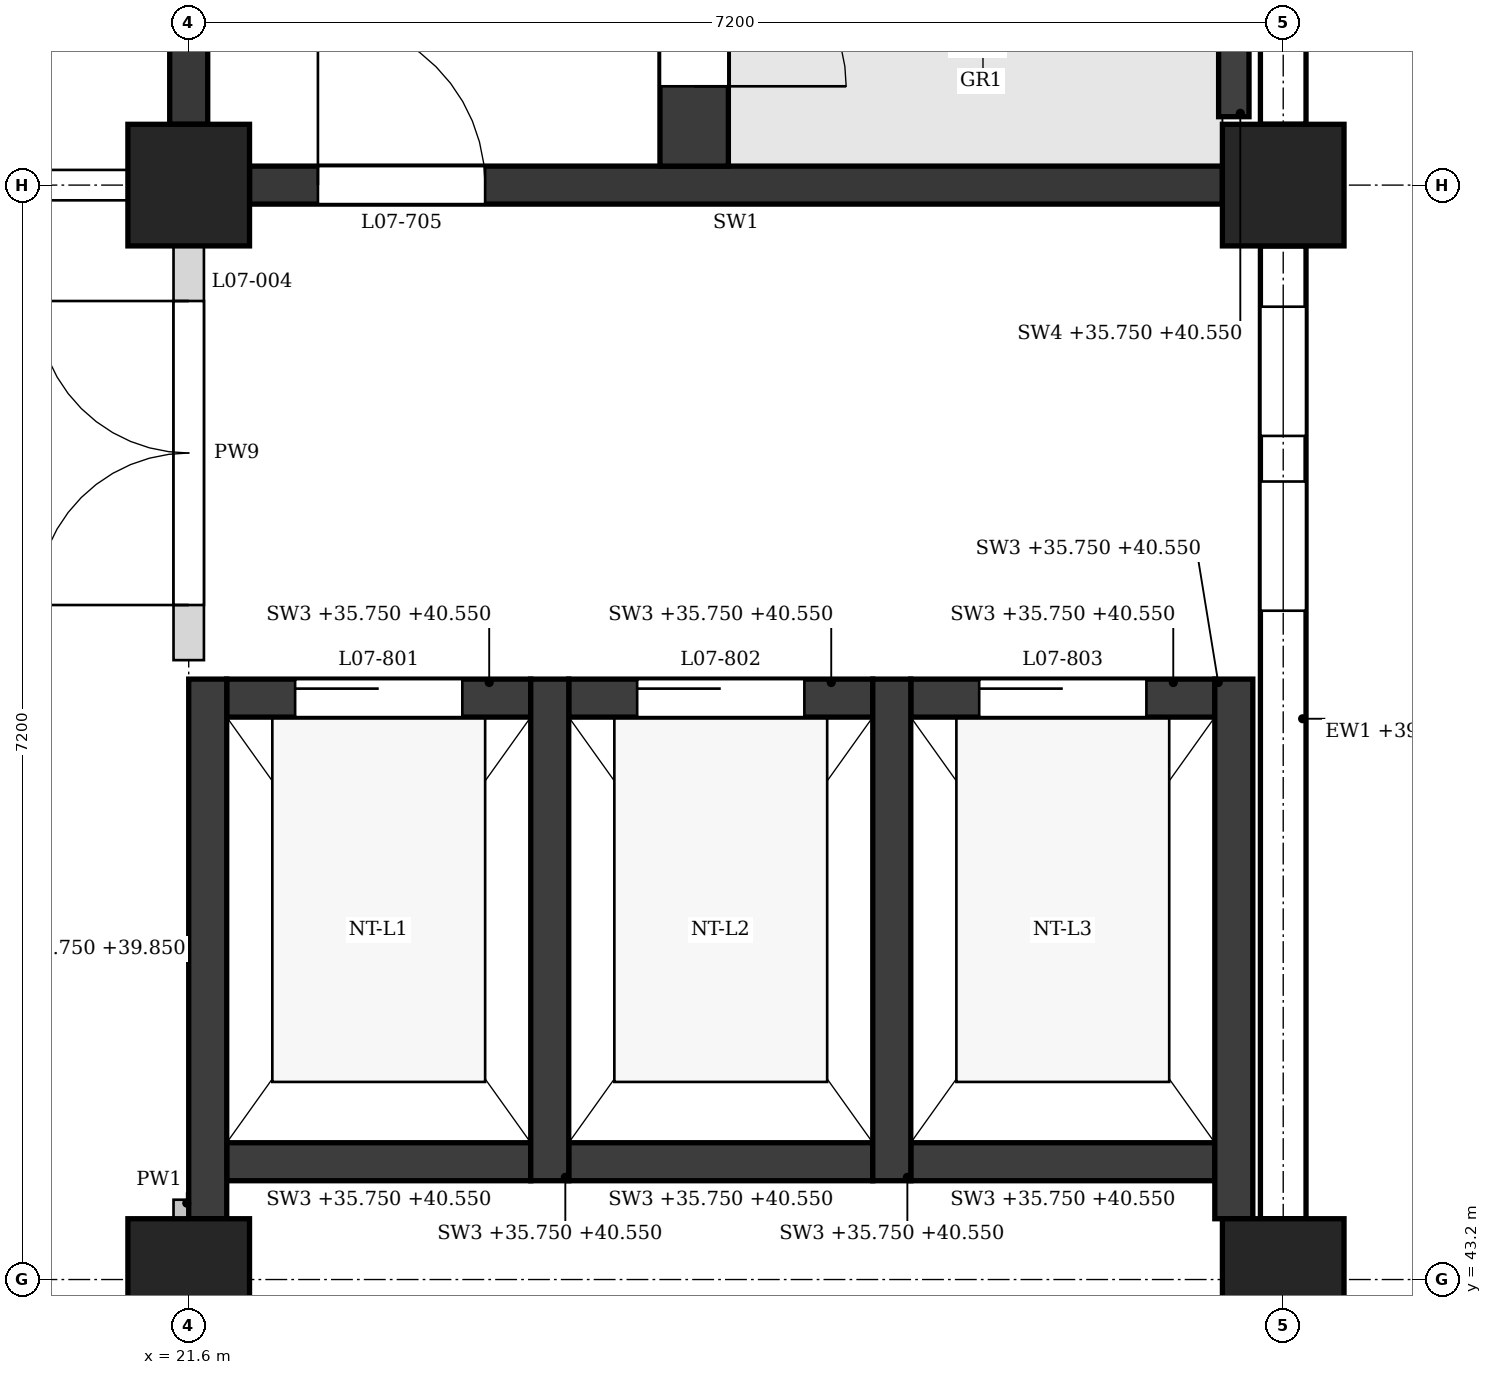
"""IFC4 building model, lengths in metres.
Left out: names, types, materials, properties, quantities, classifications, styles, units other than length and angle.
Written with IfcOpenShell. Run it as: python <this file> out.ifc"""

import sys

from ifc_helpers import new_model, si_unit, direction, frame, frame_2d, origin, origin_2d, place, context, subcontext, project, spatial, polyline, rectangle, outline, extrude, element, fill, save


model = new_model("IFC4")
c1 = context("Model", 3, precision=1e-05, world=origin(), true_north=direction((0.0, 1.0)))
c2 = subcontext(c1, "Body", "Model", "MODEL_VIEW")
j1 = project(units=[si_unit("LENGTHUNIT", "METRE"), si_unit("PLANEANGLEUNIT", "RADIAN")], contexts=[c1])
p1 = place(None, origin())
s1 = spatial("IfcSite", under=j1, at=p1, CompositionType="ELEMENT")
p2 = place(p1, origin())
s2 = spatial("IfcBuilding", under=s1, at=p2, CompositionType="ELEMENT")
p3 = place(p2, frame((0.0, 0.0, 36.0)))
s3 = spatial("IfcBuildingStorey", under=s2, at=p3, CompositionType="ELEMENT", Elevation=36.0)
for number, where, z_axis, x_axis in (
    (1, (21.6, 43.2, 0.0), (0.0, 0.0, 1.0), (1.0, 0.0, 0.0)),
    (2, (21.6, 50.4, 0.0), (0.0, 0.0, 1.0), (1.0, 0.0, 0.0)),
    (3, (28.8, 43.2, 0.0), (0.0, 0.0, 1.0), (1.0, 0.0, 0.0)),
    (4, (28.8, 50.4, 0.0), (0.0, 0.0, 1.0), (1.0, 0.0, 0.0)),
):
    element("IfcColumn", number, at=place(p3, frame(where, z_axis=z_axis, x_axis=x_axis)), inside=s3, PredefinedType="COLUMN", context=c2, shape_type="SweptSolid", body=[
        extrude(rectangle(XDim=0.8, YDim=0.8, at=origin_2d()), origin(), (0.0, 0.0, 1.0), 4.8),
    ])
p4 = place(p3, frame((28.8, 43.6, 0.0), z_axis=(0.0, 0.0, 1.0), x_axis=(0.0, 1.0, 0.0)))
e5 = element("IfcWall", 5, at=p4, inside=s3, PredefinedType="STANDARD", context=c2, shape_type="SweptSolid", body=[
    extrude(rectangle(XDim=6.4, YDim=0.3, at=frame_2d((3.2, 0.0))), origin(), (0.0, 0.0, 1.0), 3.95),
])
p5 = place(p4, frame((4.0, 0.0, 0.9)))
e6 = element("IfcOpeningElement", 6, at=p5, cuts=e5, PredefinedType="OPENING", context=c2, shape_type="SweptSolid", body=[
    extrude(outline(polyline([(0.0, 0.0), (0.85, 0.0), (0.85, 2.55), (0.425, 3.0), (0.0, 2.55), (0.0, 0.0)])), frame((0.0, 0.16, 0.0), z_axis=(0.0, -1.0, 0.0), x_axis=(1.0, 0.0, 0.0)), (0.0, 0.0, 1.0), 0.32),
])
p6 = place(p4, frame((5.15, 0.0, 0.9)))
e7 = element("IfcOpeningElement", 7, at=p6, cuts=e5, PredefinedType="OPENING", context=c2, shape_type="SweptSolid", body=[
    extrude(outline(polyline([(0.0, 0.0), (0.85, 0.0), (0.85, 2.55), (0.425, 3.0), (0.0, 2.55), (0.0, 0.0)])), frame((0.0, 0.16, 0.0), z_axis=(0.0, -1.0, 0.0), x_axis=(1.0, 0.0, 0.0)), (0.0, 0.0, 1.0), 0.32),
])
p7 = place(p3, frame((28.8, 50.8, 0.0), z_axis=(0.0, 0.0, 1.0), x_axis=(0.0, 1.0, 0.0)))
e8 = element("IfcWall", 8, at=p7, inside=s3, PredefinedType="STANDARD", context=c2, shape_type="SweptSolid", body=[
    extrude(rectangle(XDim=6.4, YDim=0.3, at=frame_2d((3.2, 0.0))), origin(), (0.0, 0.0, 1.0), 3.95),
])
p8 = place(p7, frame((0.95, 0.0, 0.9)))
e9 = element("IfcOpeningElement", 9, at=p8, cuts=e8, PredefinedType="OPENING", context=c2, shape_type="SweptSolid", body=[
    extrude(outline(polyline([(0.0, 0.0), (0.9, 0.0), (0.9, 2.55), (0.45, 3.0), (0.0, 2.55), (0.0, 0.0)])), frame((0.0, 0.16, 0.0), z_axis=(0.0, -1.0, 0.0), x_axis=(1.0, 0.0, 0.0)), (0.0, 0.0, 1.0), 0.32),
])
p9 = place(p7, frame((4.55, 0.0, 0.9)))
e10 = element("IfcOpeningElement", 10, at=p9, cuts=e8, PredefinedType="OPENING", context=c2, shape_type="SweptSolid", body=[
    extrude(outline(polyline([(0.0, 0.0), (0.9, 0.0), (0.9, 2.55), (0.45, 3.0), (0.0, 2.55), (0.0, 0.0)])), frame((0.0, 0.16, 0.0), z_axis=(0.0, -1.0, 0.0), x_axis=(1.0, 0.0, 0.0)), (0.0, 0.0, 1.0), 0.32),
])
p10 = place(p3, frame((22.0, 50.4, 0.0), z_axis=(0.0, 0.0, 1.0), x_axis=(1.0, 0.0, 0.0)))
e11 = element("IfcWall", 11, at=p10, inside=s3, PredefinedType="SHEAR", context=c2, shape_type="SweptSolid", body=[
    extrude(rectangle(XDim=6.4, YDim=0.25, at=frame_2d((3.2, 0.0))), origin(), (0.0, 0.0, 1.0), 3.85),
])
p11 = place(p10, frame((0.45, 0.0, 0.0)))
e12 = element("IfcOpeningElement", 12, at=p11, cuts=e11, PredefinedType="OPENING", context=c2, shape_type="SweptSolid", body=[
    extrude(rectangle(XDim=1.1, YDim=2.1, at=frame_2d((0.55, 1.05))), frame((0.0, 0.135, 0.0), z_axis=(0.0, -1.0, 0.0), x_axis=(1.0, 0.0, 0.0)), (0.0, 0.0, 1.0), 0.27),
])
p12 = place(p3, frame((21.6, 50.8, 0.0), z_axis=(0.0, 0.0, 1.0), x_axis=(0.0, 1.0, 0.0)))
e13 = element("IfcWall", 13, at=p12, inside=s3, PredefinedType="SHEAR", context=c2, shape_type="SweptSolid", body=[
    extrude(rectangle(XDim=6.4, YDim=0.25, at=frame_2d((3.2, 0.0))), origin(), (0.0, 0.0, 1.0), 3.85),
])
p13 = place(p3, frame((28.475, 50.85, -0.25), z_axis=(0.0, 0.0, 1.0), x_axis=(0.0, 1.0, 0.0)))
e14 = element("IfcWall", 14, at=p13, inside=s3, PredefinedType="SHEAR", context=c2, shape_type="SweptSolid", body=[
    extrude(rectangle(XDim=0.9, YDim=0.2, at=frame_2d((0.45, 0.0))), origin(), (0.0, 0.0, 1.0), 4.8),
])
p14 = place(p3, frame((24.925, 50.525, 0.0), z_axis=(0.0, 0.0, 1.0), x_axis=(0.0, 1.0, 0.0)))
e15 = element("IfcWall", 15, at=p14, inside=s3, PredefinedType="SHEAR", context=c2, shape_type="SweptSolid", body=[
    extrude(rectangle(XDim=6.85, YDim=0.45, at=frame_2d((3.425, 0.0))), origin(), (0.0, 0.0, 1.0), 4.55),
])
p15 = place(p14, frame((0.525, 0.0, 0.0)))
e16 = element("IfcOpeningElement", 16, at=p15, cuts=e15, PredefinedType="OPENING", context=c2, shape_type="SweptSolid", body=[
    extrude(rectangle(XDim=1.0, YDim=2.1, at=frame_2d((0.5, 1.05))), frame((0.0, 0.235, 0.0), z_axis=(0.0, -1.0, 0.0), x_axis=(1.0, 0.0, 0.0)), (0.0, 0.0, 1.0), 0.47),
])
p16 = place(p3, frame((21.725, 43.6, -0.25), z_axis=(0.0, 0.0, 1.0), x_axis=(0.0, 1.0, 0.0)))
e17 = element("IfcWall", 17, at=p16, inside=s3, PredefinedType="SHEAR", context=c2, shape_type="SweptSolid", body=[
    extrude(rectangle(XDim=3.55, YDim=0.25, at=frame_2d((1.775, 0.0))), origin(), (0.0, 0.0, 1.0), 4.1),
])
for number, where, z_axis, x_axis in (
    (18, (23.975, 43.85, -0.25), (0.0, 0.0, 1.0), (0.0, 1.0, 0.0)),
    (19, (26.225, 43.85, -0.25), (0.0, 0.0, 1.0), (0.0, 1.0, 0.0)),
):
    element("IfcWall", number, at=place(p3, frame(where, z_axis=z_axis, x_axis=x_axis)), inside=s3, PredefinedType="SHEAR", context=c2, shape_type="SweptSolid", body=[
        extrude(rectangle(XDim=3.3, YDim=0.25, at=frame_2d((1.65, 0.0))), origin(), (0.0, 0.0, 1.0), 4.8),
    ])
p17 = place(p3, frame((28.475, 43.6, -0.25), z_axis=(0.0, 0.0, 1.0), x_axis=(0.0, 1.0, 0.0)))
e20 = element("IfcWall", 20, at=p17, inside=s3, PredefinedType="SHEAR", context=c2, shape_type="SweptSolid", body=[
    extrude(rectangle(XDim=3.55, YDim=0.25, at=frame_2d((1.775, 0.0))), origin(), (0.0, 0.0, 1.0), 4.8),
])
p18 = place(p3, frame((21.85, 47.025, -0.25), z_axis=(0.0, 0.0, 1.0), x_axis=(1.0, 0.0, 0.0)))
e21 = element("IfcWall", 21, at=p18, inside=s3, PredefinedType="SHEAR", context=c2, shape_type="SweptSolid", body=[
    extrude(rectangle(XDim=2.0, YDim=0.25, at=frame_2d((1.0, 0.0))), origin(), (0.0, 0.0, 1.0), 4.8),
])
p19 = place(p18, frame((0.45, 0.0, 0.25)))
e22 = element("IfcOpeningElement", 22, at=p19, cuts=e21, PredefinedType="OPENING", context=c2, shape_type="SweptSolid", body=[
    extrude(rectangle(XDim=1.1, YDim=2.1, at=frame_2d((0.55, 1.05))), frame((0.0, 0.135, 0.0), z_axis=(0.0, -1.0, 0.0), x_axis=(1.0, 0.0, 0.0)), (0.0, 0.0, 1.0), 0.27),
])
p20 = place(p3, frame((21.85, 43.975, -0.25), z_axis=(0.0, 0.0, 1.0), x_axis=(1.0, 0.0, 0.0)))
e23 = element("IfcWall", 23, at=p20, inside=s3, PredefinedType="SHEAR", context=c2, shape_type="SweptSolid", body=[
    extrude(rectangle(XDim=2.0, YDim=0.25, at=frame_2d((1.0, 0.0))), origin(), (0.0, 0.0, 1.0), 4.8),
])
p21 = place(p3, frame((24.1, 47.025, -0.25), z_axis=(0.0, 0.0, 1.0), x_axis=(1.0, 0.0, 0.0)))
e24 = element("IfcWall", 24, at=p21, inside=s3, PredefinedType="SHEAR", context=c2, shape_type="SweptSolid", body=[
    extrude(rectangle(XDim=2.0, YDim=0.25, at=frame_2d((1.0, 0.0))), origin(), (0.0, 0.0, 1.0), 4.8),
])
p22 = place(p21, frame((0.45, 0.0, 0.25)))
e25 = element("IfcOpeningElement", 25, at=p22, cuts=e24, PredefinedType="OPENING", context=c2, shape_type="SweptSolid", body=[
    extrude(rectangle(XDim=1.1, YDim=2.1, at=frame_2d((0.55, 1.05))), frame((0.0, 0.135, 0.0), z_axis=(0.0, -1.0, 0.0), x_axis=(1.0, 0.0, 0.0)), (0.0, 0.0, 1.0), 0.27),
])
p23 = place(p3, frame((24.1, 43.975, -0.25), z_axis=(0.0, 0.0, 1.0), x_axis=(1.0, 0.0, 0.0)))
e26 = element("IfcWall", 26, at=p23, inside=s3, PredefinedType="SHEAR", context=c2, shape_type="SweptSolid", body=[
    extrude(rectangle(XDim=2.0, YDim=0.25, at=frame_2d((1.0, 0.0))), origin(), (0.0, 0.0, 1.0), 4.8),
])
p24 = place(p3, frame((26.35, 47.025, -0.25), z_axis=(0.0, 0.0, 1.0), x_axis=(1.0, 0.0, 0.0)))
e27 = element("IfcWall", 27, at=p24, inside=s3, PredefinedType="SHEAR", context=c2, shape_type="SweptSolid", body=[
    extrude(rectangle(XDim=2.0, YDim=0.25, at=frame_2d((1.0, 0.0))), origin(), (0.0, 0.0, 1.0), 4.8),
])
p25 = place(p24, frame((0.45, 0.0, 0.25)))
e28 = element("IfcOpeningElement", 28, at=p25, cuts=e27, PredefinedType="OPENING", context=c2, shape_type="SweptSolid", body=[
    extrude(rectangle(XDim=1.1, YDim=2.1, at=frame_2d((0.55, 1.05))), frame((0.0, 0.135, 0.0), z_axis=(0.0, -1.0, 0.0), x_axis=(1.0, 0.0, 0.0)), (0.0, 0.0, 1.0), 0.27),
])
p26 = place(p3, frame((26.35, 43.975, -0.25), z_axis=(0.0, 0.0, 1.0), x_axis=(1.0, 0.0, 0.0)))
e29 = element("IfcWall", 29, at=p26, inside=s3, PredefinedType="SHEAR", context=c2, shape_type="SweptSolid", body=[
    extrude(rectangle(XDim=2.0, YDim=0.25, at=frame_2d((1.0, 0.0))), origin(), (0.0, 0.0, 1.0), 4.8),
])
p27 = place(p3, frame((14.8, 50.4, 0.0), z_axis=(0.0, 0.0, 1.0), x_axis=(1.0, 0.0, 0.0)))
e30 = element("IfcWall", 30, at=p27, inside=s3, PredefinedType="PARTITIONING", context=c2, shape_type="SweptSolid", body=[
    extrude(rectangle(XDim=6.4, YDim=0.2, at=frame_2d((3.2, 0.0))), origin(), (0.0, 0.0, 1.0), 3.85),
])
p28 = place(p27, frame((4.3, 0.0, 0.0)))
e31 = element("IfcOpeningElement", 31, at=p28, cuts=e30, PredefinedType="OPENING", context=c2, shape_type="SweptSolid", body=[
    extrude(rectangle(XDim=1.0, YDim=2.1, at=frame_2d((0.5, 1.05))), frame((0.0, 0.11, 0.0), z_axis=(0.0, -1.0, 0.0), x_axis=(1.0, 0.0, 0.0)), (0.0, 0.0, 1.0), 0.22),
])
p29 = place(p3, frame((21.6, 43.6, 0.0), z_axis=(0.0, 0.0, 1.0), x_axis=(0.0, 1.0, 0.0)))
e32 = element("IfcWall", 32, at=p29, inside=s3, PredefinedType="PARTITIONING", context=c2, shape_type="SweptSolid", body=[
    extrude(rectangle(XDim=0.125, YDim=0.2, at=frame_2d((0.062, 0.0))), origin(), (0.0, 0.0, 1.0), 3.85),
])
p30 = place(p3, frame((21.6, 47.275, 0.0), z_axis=(0.0, 0.0, 1.0), x_axis=(0.0, 1.0, 0.0)))
e33 = element("IfcWall", 33, at=p30, inside=s3, PredefinedType="PARTITIONING", context=c2, shape_type="SweptSolid", body=[
    extrude(rectangle(XDim=2.725, YDim=0.2, at=frame_2d((1.363, 0.0))), origin(), (0.0, 0.0, 1.0), 3.85),
])
p31 = place(p30, frame((0.363, 0.0, 0.0)))
e34 = element("IfcOpeningElement", 34, at=p31, cuts=e33, PredefinedType="OPENING", context=c2, shape_type="SweptSolid", body=[
    extrude(rectangle(XDim=2.0, YDim=2.4, at=frame_2d((1.0, 1.2))), frame((0.0, 0.11, 0.0), z_axis=(0.0, -1.0, 0.0), x_axis=(1.0, 0.0, 0.0)), (0.0, 0.0, 1.0), 0.22),
])
p32 = place(p5, origin())
e35 = element("IfcWindow", 35, at=p32, inside=s3, PartitioningType="SINGLE_PANEL", PredefinedType="WINDOW", context=c2, shape_type="SweptSolid", body=[
    extrude(outline(polyline([(0.0, 0.0), (0.85, 0.0), (0.85, 2.55), (0.425, 3.0), (0.0, 2.55), (0.0, 0.0)])), frame((0.0, 0.03, 0.0), z_axis=(0.0, -1.0, 0.0), x_axis=(1.0, 0.0, 0.0)), (0.0, 0.0, 1.0), 0.06),
])
fill(e6, e35)
p33 = place(p6, origin())
e36 = element("IfcWindow", 36, at=p33, inside=s3, PartitioningType="SINGLE_PANEL", PredefinedType="WINDOW", context=c2, shape_type="SweptSolid", body=[
    extrude(outline(polyline([(0.0, 0.0), (0.85, 0.0), (0.85, 2.55), (0.425, 3.0), (0.0, 2.55), (0.0, 0.0)])), frame((0.0, 0.03, 0.0), z_axis=(0.0, -1.0, 0.0), x_axis=(1.0, 0.0, 0.0)), (0.0, 0.0, 1.0), 0.06),
])
fill(e7, e36)
p34 = place(p15, frame((1.0, 0.0, 0.0), z_axis=(0.0, 0.0, 1.0), x_axis=(-1.0, 0.0, 0.0)))
e37 = element("IfcDoor", 37, at=p34, inside=s3, OperationType="SINGLE_SWING_RIGHT", PredefinedType="DOOR", context=c2, shape_type="SweptSolid", body=[
    extrude(rectangle(XDim=1.0, YDim=2.1, at=frame_2d((0.5, 1.05))), frame((0.0, 0.025, 0.0), z_axis=(0.0, -1.0, 0.0), x_axis=(1.0, 0.0, 0.0)), (0.0, 0.0, 1.0), 0.05),
])
fill(e16, e37)
p35 = place(p11, origin())
e38 = element("IfcDoor", 38, at=p35, inside=s3, OperationType="SINGLE_SWING_LEFT", PredefinedType="DOOR", context=c2, shape_type="SweptSolid", body=[
    extrude(rectangle(XDim=1.1, YDim=2.1, at=frame_2d((0.55, 1.05))), frame((0.0, 0.025, 0.0), z_axis=(0.0, -1.0, 0.0), x_axis=(1.0, 0.0, 0.0)), (0.0, 0.0, 1.0), 0.05),
])
fill(e12, e38)
p36 = place(p19, origin())
e39 = element("IfcDoor", 39, at=p36, inside=s3, OperationType="SLIDING_TO_LEFT", PredefinedType="DOOR", context=c2, shape_type="SweptSolid", body=[
    extrude(rectangle(XDim=1.1, YDim=2.1, at=frame_2d((0.55, 1.05))), frame((0.0, 0.025, 0.0), z_axis=(0.0, -1.0, 0.0), x_axis=(1.0, 0.0, 0.0)), (0.0, 0.0, 1.0), 0.05),
])
fill(e22, e39)
p37 = place(p22, origin())
e40 = element("IfcDoor", 40, at=p37, inside=s3, OperationType="SLIDING_TO_LEFT", PredefinedType="DOOR", context=c2, shape_type="SweptSolid", body=[
    extrude(rectangle(XDim=1.1, YDim=2.1, at=frame_2d((0.55, 1.05))), frame((0.0, 0.025, 0.0), z_axis=(0.0, -1.0, 0.0), x_axis=(1.0, 0.0, 0.0)), (0.0, 0.0, 1.0), 0.05),
])
fill(e25, e40)
p38 = place(p25, origin())
e41 = element("IfcDoor", 41, at=p38, inside=s3, OperationType="SLIDING_TO_LEFT", PredefinedType="DOOR", context=c2, shape_type="SweptSolid", body=[
    extrude(rectangle(XDim=1.1, YDim=2.1, at=frame_2d((0.55, 1.05))), frame((0.0, 0.025, 0.0), z_axis=(0.0, -1.0, 0.0), x_axis=(1.0, 0.0, 0.0)), (0.0, 0.0, 1.0), 0.05),
])
fill(e28, e41)
p39 = place(p31, origin())
e42 = element("IfcDoor", 42, at=p39, inside=s3, OperationType="DOUBLE_DOOR_SINGLE_SWING", PredefinedType="DOOR", context=c2, shape_type="SweptSolid", body=[
    extrude(rectangle(XDim=2.0, YDim=2.4, at=frame_2d((1.0, 1.2))), frame((0.0, 0.025, 0.0), z_axis=(0.0, -1.0, 0.0), x_axis=(1.0, 0.0, 0.0)), (0.0, 0.0, 1.0), 0.05),
])
fill(e34, e42)
save(model, sys.argv[1])
